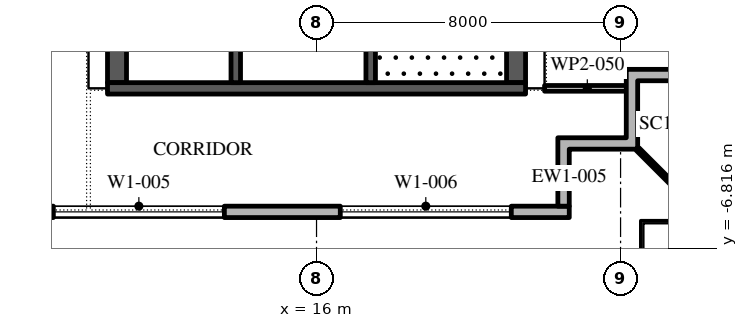
"""IFC4 building model, lengths in metres.
Left out: names, types, materials, properties, quantities, classifications, styles, units other than length and angle.
Written with IfcOpenShell. Run it as: python <this file> out.ifc"""

import sys

from ifc_helpers import new_model, si_unit, direction, frame, frame_2d, origin, place, context, subcontext, project, spatial, polyline, rectangle, outline, extrude, element, fill, save


model = new_model("IFC4")
c1 = context("Model", 3, precision=1e-05, world=origin(), true_north=direction((0.0, 1.0)))
c2 = subcontext(c1, "Body", "Model", "MODEL_VIEW")
j1 = project(units=[si_unit("LENGTHUNIT", "METRE"), si_unit("PLANEANGLEUNIT", "RADIAN")], contexts=[c1])
p1 = place(None, origin())
s1 = spatial("IfcSite", under=j1, at=p1, CompositionType="ELEMENT")
p2 = place(p1, origin())
s2 = spatial("IfcBuilding", under=s1, at=p2, CompositionType="ELEMENT")
p3 = place(p2, frame((0.0, 0.0, 338.4)))
s3 = spatial("IfcBuildingStorey", under=s2, at=p3, CompositionType="ELEMENT", Elevation=338.4)
p4 = place(p3, frame((-22.35, -5.85, 0.0), z_axis=(0.0, 0.0, 1.0), x_axis=(1.0, 0.0, 0.0)))
e1 = element("IfcWall", 1, at=p4, inside=s3, PredefinedType="STANDARD", context=c2, shape_type="SweptSolid", body=[
    extrude(rectangle(XDim=45.0, YDim=0.3, at=frame_2d((22.5, 0.0))), origin(), (0.0, 0.0, 1.0), 4.0),
])
p5 = place(p4, frame((1.375, 0.0, 0.45)))
e2 = element("IfcOpeningElement", 2, at=p5, cuts=e1, PredefinedType="OPENING", context=c2, shape_type="SweptSolid", body=[
    extrude(rectangle(XDim=4.5, YDim=3.05, at=frame_2d((2.25, 1.525))), frame((0.0, 0.16, 0.0), z_axis=(0.0, -1.0, 0.0), x_axis=(1.0, 0.0, 0.0)), (0.0, 0.0, 1.0), 0.32),
])
p6 = place(p4, frame((8.775, 0.0, 0.45)))
e3 = element("IfcOpeningElement", 3, at=p6, cuts=e1, PredefinedType="OPENING", context=c2, shape_type="SweptSolid", body=[
    extrude(rectangle(XDim=4.5, YDim=3.05, at=frame_2d((2.25, 1.525))), frame((0.0, 0.16, 0.0), z_axis=(0.0, -1.0, 0.0), x_axis=(1.0, 0.0, 0.0)), (0.0, 0.0, 1.0), 0.32),
])
p7 = place(p4, frame((17.375, 0.0, 0.0)))
e4 = element("IfcOpeningElement", 4, at=p7, cuts=e1, PredefinedType="OPENING", context=c2, shape_type="SweptSolid", body=[
    extrude(rectangle(XDim=2.4, YDim=3.5, at=frame_2d((1.2, 1.75))), frame((0.0, 0.16, 0.0), z_axis=(0.0, -1.0, 0.0), x_axis=(1.0, 0.0, 0.0)), (0.0, 0.0, 1.0), 0.32),
])
p8 = place(p4, frame((23.875, 0.0, 0.45)))
e5 = element("IfcOpeningElement", 5, at=p8, cuts=e1, PredefinedType="OPENING", context=c2, shape_type="SweptSolid", body=[
    extrude(rectangle(XDim=4.5, YDim=3.05, at=frame_2d((2.25, 1.525))), frame((0.0, 0.16, 0.0), z_axis=(0.0, -1.0, 0.0), x_axis=(1.0, 0.0, 0.0)), (0.0, 0.0, 1.0), 0.32),
])
p9 = place(p4, frame((31.425, 0.0, 0.45)))
e6 = element("IfcOpeningElement", 6, at=p9, cuts=e1, PredefinedType="OPENING", context=c2, shape_type="SweptSolid", body=[
    extrude(rectangle(XDim=4.5, YDim=3.05, at=frame_2d((2.25, 1.525))), frame((0.0, 0.16, 0.0), z_axis=(0.0, -1.0, 0.0), x_axis=(1.0, 0.0, 0.0)), (0.0, 0.0, 1.0), 0.32),
])
p10 = place(p4, frame((38.975, 0.0, 0.45)))
e7 = element("IfcOpeningElement", 7, at=p10, cuts=e1, PredefinedType="OPENING", context=c2, shape_type="SweptSolid", body=[
    extrude(rectangle(XDim=4.5, YDim=3.05, at=frame_2d((2.25, 1.525))), frame((0.0, 0.16, 0.0), z_axis=(0.0, -1.0, 0.0), x_axis=(1.0, 0.0, 0.0)), (0.0, 0.0, 1.0), 0.32),
])
p11 = place(p3, origin())
e8 = element("IfcWall", 8, at=p11, inside=s3, PredefinedType="STANDARD", context=c2, shape_type="SweptSolid", body=[
    extrude(outline(polyline([(24.15, -3.9), (24.15, -2.1), (26.25, -2.1), (26.25, -2.4), (24.45, -2.4), (24.45, -4.2), (22.65, -4.2), (22.65, -5.7), (22.35, -5.7), (22.35, -3.9), (24.15, -3.9)])), origin(), (0.0, 0.0, 1.0), 4.0),
])
p12 = place(p3, frame((24.45, -4.2, -0.05), z_axis=(0.0, 0.0, 1.0), x_axis=(0.707106781187, -0.707106781187, 0.0)))
e9 = element("IfcWall", 9, at=p12, inside=s3, PredefinedType="STANDARD", context=c2, shape_type="SweptSolid", body=[
    extrude(rectangle(XDim=2.667, YDim=0.1, at=frame_2d((1.333, 0.0))), origin(), (0.0, 0.0, 1.0), 4.05),
])
p13 = place(p3, frame((21.25, -2.45, 0.0), z_axis=(0.0, 0.0, 1.0), x_axis=(0.0, 1.0, 0.0)))
e10 = element("IfcWall", 10, at=p13, inside=s3, PredefinedType="SHEAR", context=c2, shape_type="SweptSolid", body=[
    extrude(rectangle(XDim=27.9, YDim=0.5, at=frame_2d((13.95, 0.0))), origin(), (0.0, 0.0, 1.0), 4.0),
])
p14 = place(p13, frame((5.05, 0.0, 0.0)))
e11 = element("IfcOpeningElement", 11, at=p14, cuts=e10, PredefinedType="OPENING", context=c2, shape_type="SweptSolid", body=[
    extrude(rectangle(XDim=1.2, YDim=2.1, at=frame_2d((0.6, 1.05))), frame((0.0, 0.26, 0.0), z_axis=(0.0, -1.0, 0.0), x_axis=(1.0, 0.0, 0.0)), (0.0, 0.0, 1.0), 0.52),
])
p15 = place(p13, frame((21.65, 0.0, 0.0)))
e12 = element("IfcOpeningElement", 12, at=p15, cuts=e10, PredefinedType="OPENING", context=c2, shape_type="SweptSolid", body=[
    extrude(rectangle(XDim=1.2, YDim=2.1, at=frame_2d((0.6, 1.05))), frame((0.0, 0.26, 0.0), z_axis=(0.0, -1.0, 0.0), x_axis=(1.0, 0.0, 0.0)), (0.0, 0.0, 1.0), 0.52),
])
p16 = place(p3, frame((10.75, -2.45, 0.0), z_axis=(0.0, 0.0, 1.0), x_axis=(0.0, 1.0, 0.0)))
e13 = element("IfcWall", 13, at=p16, inside=s3, PredefinedType="SHEAR", context=c2, shape_type="SweptSolid", body=[
    extrude(rectangle(XDim=27.9, YDim=0.5, at=frame_2d((13.95, 0.0))), origin(), (0.0, 0.0, 1.0), 4.0),
])
p17 = place(p16, frame((23.65, 0.0, 0.0)))
e14 = element("IfcOpeningElement", 14, at=p17, cuts=e13, PredefinedType="OPENING", context=c2, shape_type="SweptSolid", body=[
    extrude(rectangle(XDim=2.4, YDim=2.1, at=frame_2d((1.2, 1.05))), frame((0.0, 0.26, 0.0), z_axis=(0.0, -1.0, 0.0), x_axis=(1.0, 0.0, 0.0)), (0.0, 0.0, 1.0), 0.52),
])
p18 = place(p16, frame((1.387, 0.0, 0.0)))
e15 = element("IfcOpeningElement", 15, at=p18, cuts=e13, PredefinedType="OPENING", context=c2, shape_type="SweptSolid", body=[
    extrude(rectangle(XDim=0.9, YDim=2.1, at=frame_2d((0.45, 1.05))), frame((0.0, 0.26, 0.0), z_axis=(0.0, -1.0, 0.0), x_axis=(1.0, 0.0, 0.0)), (0.0, 0.0, 1.0), 0.52),
])
p19 = place(p16, frame((4.562, 0.0, 0.0)))
e16 = element("IfcOpeningElement", 16, at=p19, cuts=e13, PredefinedType="OPENING", context=c2, shape_type="SweptSolid", body=[
    extrude(rectangle(XDim=1.0, YDim=2.1, at=frame_2d((0.5, 1.05))), frame((0.0, 0.26, 0.0), z_axis=(0.0, -1.0, 0.0), x_axis=(1.0, 0.0, 0.0)), (0.0, 0.0, 1.0), 0.52),
])
p20 = place(p3, frame((10.5, -2.6, 0.0), z_axis=(0.0, 0.0, 1.0), x_axis=(1.0, 0.0, 0.0)))
e17 = element("IfcWall", 17, at=p20, inside=s3, PredefinedType="SHEAR", context=c2, shape_type="SweptSolid", body=[
    extrude(rectangle(XDim=11.0, YDim=0.3, at=frame_2d((5.5, 0.0))), origin(), (0.0, 0.0, 1.0), 4.0),
])
p21 = place(p3, frame((17.425, -2.45, 0.0), z_axis=(0.0, 0.0, 1.0), x_axis=(0.0, 1.0, 0.0)))
e18 = element("IfcWall", 18, at=p21, inside=s3, PredefinedType="SHEAR", context=c2, shape_type="SweptSolid", body=[
    extrude(rectangle(XDim=6.3, YDim=0.25, at=frame_2d((3.15, 0.0))), origin(), (0.0, 0.0, 1.0), 4.0),
])
p22 = place(p21, frame((5.05, 0.0, 0.0)))
e19 = element("IfcOpeningElement", 19, at=p22, cuts=e18, PredefinedType="OPENING", context=c2, shape_type="SweptSolid", body=[
    extrude(rectangle(XDim=1.2, YDim=2.1, at=frame_2d((0.6, 1.05))), frame((0.0, 0.135, 0.0), z_axis=(0.0, -1.0, 0.0), x_axis=(1.0, 0.0, 0.0)), (0.0, 0.0, 1.0), 0.27),
])
p23 = place(p3, frame((13.875, -2.45, 0.0), z_axis=(0.0, 0.0, 1.0), x_axis=(0.0, 1.0, 0.0)))
e20 = element("IfcWall", 20, at=p23, inside=s3, PredefinedType="SHEAR", context=c2, shape_type="SweptSolid", body=[
    extrude(rectangle(XDim=21.3, YDim=0.25, at=frame_2d((10.65, 0.0))), origin(), (0.0, 0.0, 1.0), 4.0),
])
p24 = place(p23, frame((9.846, 0.0, 0.0)))
e21 = element("IfcOpeningElement", 21, at=p24, cuts=e20, PredefinedType="OPENING", context=c2, shape_type="SweptSolid", body=[
    extrude(rectangle(XDim=0.9, YDim=2.1, at=frame_2d((0.45, 1.05))), frame((0.0, 0.135, 0.0), z_axis=(0.0, -1.0, 0.0), x_axis=(1.0, 0.0, 0.0)), (0.0, 0.0, 1.0), 0.27),
])
p25 = place(p23, frame((12.911, 0.0, 0.0)))
e22 = element("IfcOpeningElement", 22, at=p25, cuts=e20, PredefinedType="OPENING", context=c2, shape_type="SweptSolid", body=[
    extrude(rectangle(XDim=0.9, YDim=2.1, at=frame_2d((0.45, 1.05))), frame((0.0, 0.135, 0.0), z_axis=(0.0, -1.0, 0.0), x_axis=(1.0, 0.0, 0.0)), (0.0, 0.0, 1.0), 0.27),
])
p26 = place(p23, frame((6.971, 0.0, 0.0)))
e23 = element("IfcOpeningElement", 23, at=p26, cuts=e20, PredefinedType="OPENING", context=c2, shape_type="SweptSolid", body=[
    extrude(rectangle(XDim=1.1, YDim=2.1, at=frame_2d((0.55, 1.05))), frame((0.0, 0.135, 0.0), z_axis=(0.0, -1.0, 0.0), x_axis=(1.0, 0.0, 0.0)), (0.0, 0.0, 1.0), 0.27),
])
p27 = place(p23, frame((15.543, 0.0, 0.0)))
e24 = element("IfcOpeningElement", 24, at=p27, cuts=e20, PredefinedType="OPENING", context=c2, shape_type="SweptSolid", body=[
    extrude(rectangle(XDim=1.1, YDim=2.1, at=frame_2d((0.55, 1.05))), frame((0.0, 0.135, 0.0), z_axis=(0.0, -1.0, 0.0), x_axis=(1.0, 0.0, 0.0)), (0.0, 0.0, 1.0), 0.27),
])
p28 = place(p23, frame((17.686, 0.0, 0.0)))
e25 = element("IfcOpeningElement", 25, at=p28, cuts=e20, PredefinedType="OPENING", context=c2, shape_type="SweptSolid", body=[
    extrude(rectangle(XDim=1.1, YDim=2.1, at=frame_2d((0.55, 1.05))), frame((0.0, 0.135, 0.0), z_axis=(0.0, -1.0, 0.0), x_axis=(1.0, 0.0, 0.0)), (0.0, 0.0, 1.0), 0.27),
])
p29 = place(p23, frame((19.829, 0.0, 0.0)))
e26 = element("IfcOpeningElement", 26, at=p29, cuts=e20, PredefinedType="OPENING", context=c2, shape_type="SweptSolid", body=[
    extrude(rectangle(XDim=1.1, YDim=2.1, at=frame_2d((0.55, 1.05))), frame((0.0, 0.135, 0.0), z_axis=(0.0, -1.0, 0.0), x_axis=(1.0, 0.0, 0.0)), (0.0, 0.0, 1.0), 0.27),
])
p30 = place(p3, frame((22.0, -2.6, 0.0), z_axis=(0.0, 0.0, 1.0), x_axis=(1.0, 0.0, 0.0)))
e27 = element("IfcWall", 27, at=p30, inside=s3, PredefinedType="PARTITIONING", context=c2, shape_type="SweptSolid", body=[
    extrude(rectangle(XDim=2.25, YDim=0.15, at=frame_2d((1.125, 0.0))), origin(), (0.0, 0.0, 1.0), 4.0),
])
p31 = place(p9, origin())
e28 = element("IfcWindow", 28, at=p31, inside=s3, PartitioningType="DOUBLE_PANEL_VERTICAL", PredefinedType="WINDOW", context=c2, shape_type="SweptSolid", body=[
    extrude(rectangle(XDim=4.5, YDim=3.05, at=frame_2d((2.25, 1.525))), frame((0.0, 0.03, 0.0), z_axis=(0.0, -1.0, 0.0), x_axis=(1.0, 0.0, 0.0)), (0.0, 0.0, 1.0), 0.06),
])
fill(e6, e28)
p32 = place(p10, origin())
e29 = element("IfcWindow", 29, at=p32, inside=s3, PartitioningType="DOUBLE_PANEL_VERTICAL", PredefinedType="WINDOW", context=c2, shape_type="SweptSolid", body=[
    extrude(rectangle(XDim=4.5, YDim=3.05, at=frame_2d((2.25, 1.525))), frame((0.0, 0.03, 0.0), z_axis=(0.0, -1.0, 0.0), x_axis=(1.0, 0.0, 0.0)), (0.0, 0.0, 1.0), 0.06),
])
fill(e7, e29)
save(model, sys.argv[1])
